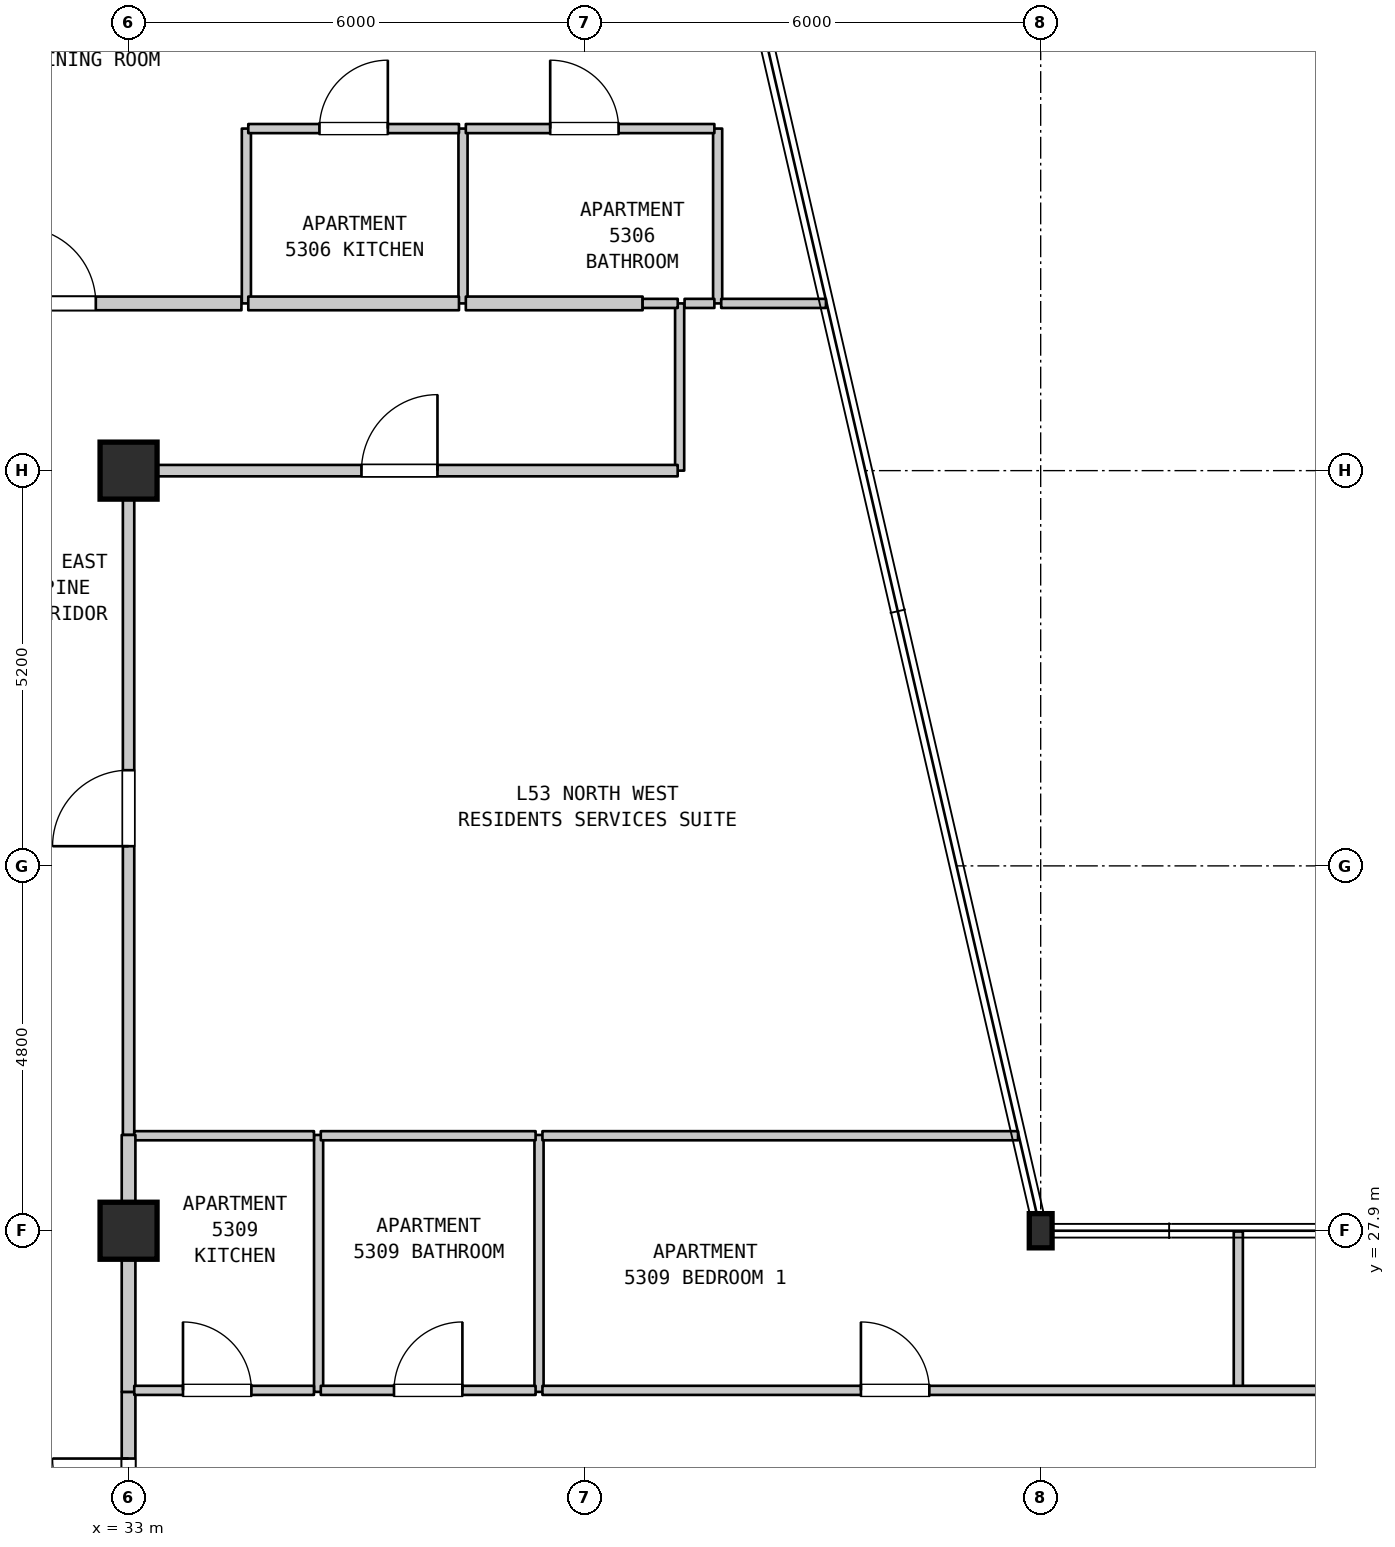
"""IFC4 building model, lengths in metres.
Left out: names, types, materials, properties, quantities, classifications, styles, units other than length and angle.
Written with IfcOpenShell. Run it as: python <this file> out.ifc"""

import sys

from ifc_helpers import new_model, si_unit, direction, frame, frame_2d, origin, origin_2d, place, context, subcontext, project, spatial, rectangle, i_section, extrude, element, fill, save


model = new_model("IFC4")
c1 = context("Model", 3, precision=1e-05, world=origin(), true_north=direction((0.0, 1.0)))
c2 = subcontext(c1, "Body", "Model", "MODEL_VIEW")
j1 = project(units=[si_unit("LENGTHUNIT", "METRE"), si_unit("PLANEANGLEUNIT", "RADIAN")], contexts=[c1])
p1 = place(None, origin())
s1 = spatial("IfcSite", under=j1, at=p1, CompositionType="ELEMENT")
p2 = place(p1, origin())
s2 = spatial("IfcBuilding", under=s1, at=p2, CompositionType="ELEMENT")
p3 = place(p2, frame((0.0, 0.0, 214.3)))
s3 = spatial("IfcBuildingStorey", under=s2, at=p3, CompositionType="ELEMENT", Elevation=214.3)
for number, where, z_axis, x_axis in (
    (1, (33.0, 27.9, 0.0), (0.0, 0.0, 1.0), (1.0, 0.0, 0.0)),
    (2, (33.0, 37.9, 0.0), (0.0, 0.0, 1.0), (1.0, 0.0, 0.0)),
):
    element("IfcColumn", number, at=place(p3, frame(where, z_axis=z_axis, x_axis=x_axis)), inside=s3, PredefinedType="COLUMN", context=c2, shape_type="SweptSolid", body=[
        extrude(rectangle(XDim=0.75, YDim=0.75, at=origin_2d()), origin(), (0.0, 0.0, 1.0), 3.7),
    ])
p4 = place(p3, frame((45.0, 27.9, 0.0), z_axis=(0.0, 0.0, 1.0), x_axis=(1.0, 0.0, 0.0)))
e3 = element("IfcColumn", 3, at=p4, inside=s3, PredefinedType="COLUMN", context=c2, shape_type="SweptSolid", body=[
    extrude(i_section(OverallWidth=0.3, OverallDepth=0.45, WebThickness=0.014, FlangeThickness=0.026, FilletRadius=0.027, at=origin_2d()), origin(), (0.0, 0.0, 1.0), 3.7),
])
p5 = place(p3, frame((33.0, 23.18, 0.0), z_axis=(0.0, 0.0, 1.0), x_axis=(0.0, 1.0, 0.0)))
e4 = element("IfcWall", 4, at=p5, inside=s3, PredefinedType="STANDARD", context=c2, shape_type="SweptSolid", body=[
    extrude(rectangle(XDim=2.6, YDim=0.18, at=frame_2d((1.3, 0.0))), origin(), (0.0, 0.0, 1.0), 2.98),
])
p6 = place(p5, frame((0.723, 0.0, 0.0)))
e5 = element("IfcOpeningElement", 5, at=p6, cuts=e4, PredefinedType="OPENING", context=c2, shape_type="SweptSolid", body=[
    extrude(rectangle(XDim=1.0, YDim=2.15, at=frame_2d((0.5, 1.075))), frame((0.0, 0.1, 0.0), z_axis=(0.0, -1.0, 0.0), x_axis=(1.0, 0.0, 0.0)), (0.0, 0.0, 1.0), 0.2),
])
p7 = place(p3, frame((33.0, 25.78, 0.0), z_axis=(0.0, 0.0, 1.0), x_axis=(0.0, 1.0, 0.0)))
e6 = element("IfcWall", 6, at=p7, inside=s3, PredefinedType="STANDARD", context=c2, shape_type="SweptSolid", body=[
    extrude(rectangle(XDim=2.12, YDim=0.18, at=frame_2d((1.06, 0.0))), origin(), (0.0, 0.0, 1.0), 2.98),
])
p8 = place(p3, frame((33.0, 29.16, 0.0), z_axis=(0.0, 0.0, 1.0), x_axis=(0.0, 1.0, 0.0)))
e7 = element("IfcWall", 7, at=p8, inside=s3, PredefinedType="STANDARD", context=c2, shape_type="SweptSolid", body=[
    extrude(rectangle(XDim=8.74, YDim=0.15, at=frame_2d((4.37, 0.0))), origin(), (0.0, 0.0, 1.0), 2.88),
])
p9 = place(p8, frame((3.799, 0.0, 0.0)))
e8 = element("IfcOpeningElement", 8, at=p9, cuts=e7, PredefinedType="OPENING", context=c2, shape_type="SweptSolid", body=[
    extrude(rectangle(XDim=1.0, YDim=2.15, at=frame_2d((0.5, 1.075))), frame((0.0, 0.085, 0.0), z_axis=(0.0, -1.0, 0.0), x_axis=(1.0, 0.0, 0.0)), (0.0, 0.0, 1.0), 0.17),
])
p10 = place(p3, frame((34.55, 40.1, 0.0), z_axis=(0.0, 0.0, 1.0), x_axis=(0.0, 1.0, 0.0)))
e9 = element("IfcWall", 9, at=p10, inside=s3, PredefinedType="PARTITIONING", context=c2, shape_type="SweptSolid", body=[
    extrude(rectangle(XDim=2.3, YDim=0.12, at=frame_2d((1.15, 0.0))), origin(), (0.0, 0.0, 1.0), 3.38),
])
p11 = place(p3, frame((35.5, 25.78, 0.0), z_axis=(0.0, 0.0, 1.0), x_axis=(0.0, 1.0, 0.0)))
e10 = element("IfcWall", 10, at=p11, inside=s3, PredefinedType="PARTITIONING", context=c2, shape_type="SweptSolid", body=[
    extrude(rectangle(XDim=3.38, YDim=0.12, at=frame_2d((1.69, 0.0))), origin(), (0.0, 0.0, 1.0), 3.38),
])
p12 = place(p3, frame((37.4, 40.1, 0.0), z_axis=(0.0, 0.0, 1.0), x_axis=(0.0, 1.0, 0.0)))
e11 = element("IfcWall", 11, at=p12, inside=s3, PredefinedType="PARTITIONING", context=c2, shape_type="SweptSolid", body=[
    extrude(rectangle(XDim=2.3, YDim=0.12, at=frame_2d((1.15, 0.0))), origin(), (0.0, 0.0, 1.0), 3.38),
])
p13 = place(p3, frame((38.4, 25.78, 0.0), z_axis=(0.0, 0.0, 1.0), x_axis=(0.0, 1.0, 0.0)))
e12 = element("IfcWall", 12, at=p13, inside=s3, PredefinedType="PARTITIONING", context=c2, shape_type="SweptSolid", body=[
    extrude(rectangle(XDim=3.38, YDim=0.12, at=frame_2d((1.69, 0.0))), origin(), (0.0, 0.0, 1.0), 3.38),
])
p14 = place(p3, frame((40.25, 37.9, 0.0), z_axis=(0.0, 0.0, 1.0), x_axis=(0.0, 1.0, 0.0)))
e13 = element("IfcWall", 13, at=p14, inside=s3, PredefinedType="PARTITIONING", context=c2, shape_type="SweptSolid", body=[
    extrude(rectangle(XDim=2.2, YDim=0.12, at=frame_2d((1.1, 0.0))), origin(), (0.0, 0.0, 1.0), 3.38),
])
p15 = place(p3, frame((40.75, 40.1, 0.0), z_axis=(0.0, 0.0, 1.0), x_axis=(0.0, 1.0, 0.0)))
e14 = element("IfcWall", 14, at=p15, inside=s3, PredefinedType="PARTITIONING", context=c2, shape_type="SweptSolid", body=[
    extrude(rectangle(XDim=2.3, YDim=0.12, at=frame_2d((1.15, 0.0))), origin(), (0.0, 0.0, 1.0), 3.38),
])
p16 = place(p3, frame((47.6, 25.78, 0.0), z_axis=(0.0, 0.0, 1.0), x_axis=(0.0, 1.0, 0.0)))
e15 = element("IfcWall", 15, at=p16, inside=s3, PredefinedType="PARTITIONING", context=c2, shape_type="SweptSolid", body=[
    extrude(rectangle(XDim=2.11, YDim=0.12, at=frame_2d((1.055, 0.0))), origin(), (0.0, 0.0, 1.0), 3.38),
])
p17 = place(p3, frame((33.075, 25.8, 0.0), z_axis=(0.0, 0.0, 1.0), x_axis=(1.0, 0.0, 0.0)))
e16 = element("IfcWall", 16, at=p17, inside=s3, PredefinedType="PARTITIONING", context=c2, shape_type="SweptSolid", body=[
    extrude(rectangle(XDim=2.364, YDim=0.12, at=frame_2d((1.182, 0.0))), origin(), (0.0, 0.0, 1.0), 3.38),
])
p18 = place(p17, frame((0.641, 0.0, 0.0)))
e17 = element("IfcOpeningElement", 17, at=p18, cuts=e16, PredefinedType="OPENING", context=c2, shape_type="SweptSolid", body=[
    extrude(rectangle(XDim=0.9, YDim=2.15, at=frame_2d((0.45, 1.075))), frame((0.0, 0.07, 0.0), z_axis=(0.0, -1.0, 0.0), x_axis=(1.0, 0.0, 0.0)), (0.0, 0.0, 1.0), 0.14),
])
p19 = place(p3, frame((35.529, 25.8, 0.0), z_axis=(0.0, 0.0, 1.0), x_axis=(1.0, 0.0, 0.0)))
e18 = element("IfcWall", 18, at=p19, inside=s3, PredefinedType="PARTITIONING", context=c2, shape_type="SweptSolid", body=[
    extrude(rectangle(XDim=2.826, YDim=0.12, at=frame_2d((1.413, 0.0))), origin(), (0.0, 0.0, 1.0), 3.38),
])
p20 = place(p19, frame((0.963, 0.0, 0.0)))
e19 = element("IfcOpeningElement", 19, at=p20, cuts=e18, PredefinedType="OPENING", context=c2, shape_type="SweptSolid", body=[
    extrude(rectangle(XDim=0.9, YDim=2.1, at=frame_2d((0.45, 1.05))), frame((0.0, 0.07, 0.0), z_axis=(0.0, -1.0, 0.0), x_axis=(1.0, 0.0, 0.0)), (0.0, 0.0, 1.0), 0.14),
])
p21 = place(p3, frame((38.445, 25.8, 0.0), z_axis=(0.0, 0.0, 1.0), x_axis=(1.0, 0.0, 0.0)))
e20 = element("IfcWall", 20, at=p21, inside=s3, PredefinedType="PARTITIONING", context=c2, shape_type="SweptSolid", body=[
    extrude(rectangle(XDim=18.545, YDim=0.12, at=frame_2d((9.272, 0.0))), origin(), (0.0, 0.0, 1.0), 3.38),
])
p22 = place(p21, frame((4.19, 0.0, 0.0)))
e21 = element("IfcOpeningElement", 21, at=p22, cuts=e20, PredefinedType="OPENING", context=c2, shape_type="SweptSolid", body=[
    extrude(rectangle(XDim=0.9, YDim=2.15, at=frame_2d((0.45, 1.075))), frame((0.0, 0.07, 0.0), z_axis=(0.0, -1.0, 0.0), x_axis=(1.0, 0.0, 0.0)), (0.0, 0.0, 1.0), 0.14),
])
p23 = place(p21, frame((13.335, 0.0, 0.0)))
e22 = element("IfcOpeningElement", 22, at=p23, cuts=e20, PredefinedType="OPENING", context=c2, shape_type="SweptSolid", body=[
    extrude(rectangle(XDim=0.9, YDim=2.15, at=frame_2d((0.45, 1.075))), frame((0.0, 0.07, 0.0), z_axis=(0.0, -1.0, 0.0), x_axis=(1.0, 0.0, 0.0)), (0.0, 0.0, 1.0), 0.14),
])
p24 = place(p3, frame((33.075, 29.15, 0.0), z_axis=(0.0, 0.0, 1.0), x_axis=(1.0, 0.0, 0.0)))
e23 = element("IfcWall", 23, at=p24, inside=s3, PredefinedType="PARTITIONING", context=c2, shape_type="SweptSolid", body=[
    extrude(rectangle(XDim=2.364, YDim=0.12, at=frame_2d((1.182, 0.0))), origin(), (0.0, 0.0, 1.0), 3.38),
])
p25 = place(p3, frame((35.529, 29.15, 0.0), z_axis=(0.0, 0.0, 1.0), x_axis=(1.0, 0.0, 0.0)))
e24 = element("IfcWall", 24, at=p25, inside=s3, PredefinedType="PARTITIONING", context=c2, shape_type="SweptSolid", body=[
    extrude(rectangle(XDim=2.826, YDim=0.12, at=frame_2d((1.413, 0.0))), origin(), (0.0, 0.0, 1.0), 3.38),
])
p26 = place(p3, frame((38.445, 29.15, 0.0), z_axis=(0.0, 0.0, 1.0), x_axis=(1.0, 0.0, 0.0)))
e25 = element("IfcWall", 25, at=p26, inside=s3, PredefinedType="PARTITIONING", context=c2, shape_type="SweptSolid", body=[
    extrude(rectangle(XDim=6.257, YDim=0.12, at=frame_2d((3.128, 0.0))), origin(), (0.0, 0.0, 1.0), 3.38),
])
p27 = place(p3, frame((33.06, 37.9, 0.0), z_axis=(0.0, 0.0, 1.0), x_axis=(1.0, 0.0, 0.0)))
e26 = element("IfcWall", 26, at=p27, inside=s3, PredefinedType="STANDARD", context=c2, shape_type="SweptSolid", body=[
    extrude(rectangle(XDim=7.164, YDim=0.15, at=frame_2d((3.582, 0.0))), origin(), (0.0, 0.0, 1.0), 3.38),
])
p28 = place(p27, frame((3.004, 0.0, 0.0)))
e27 = element("IfcOpeningElement", 27, at=p28, cuts=e26, PredefinedType="OPENING", context=c2, shape_type="SweptSolid", body=[
    extrude(rectangle(XDim=1.0, YDim=2.15, at=frame_2d((0.5, 1.075))), frame((0.0, 0.085, 0.0), z_axis=(0.0, -1.0, 0.0), x_axis=(1.0, 0.0, 0.0)), (0.0, 0.0, 1.0), 0.17),
])
p29 = place(p3, frame((29.395, 40.1, 0.0), z_axis=(0.0, 0.0, 1.0), x_axis=(1.0, 0.0, 0.0)))
e28 = element("IfcWall", 28, at=p29, inside=s3, PredefinedType="STANDARD", context=c2, shape_type="SweptSolid", body=[
    extrude(rectangle(XDim=5.09, YDim=0.18, at=frame_2d((2.545, 0.0))), origin(), (0.0, 0.0, 1.0), 3.38),
])
p30 = place(p29, frame((2.174, 0.0, 0.0)))
e29 = element("IfcOpeningElement", 29, at=p30, cuts=e28, PredefinedType="OPENING", context=c2, shape_type="SweptSolid", body=[
    extrude(rectangle(XDim=1.0, YDim=2.15, at=frame_2d((0.5, 1.075))), frame((0.0, 0.1, 0.0), z_axis=(0.0, -1.0, 0.0), x_axis=(1.0, 0.0, 0.0)), (0.0, 0.0, 1.0), 0.2),
])
p31 = place(p3, frame((34.575, 40.1, 0.0), z_axis=(0.0, 0.0, 1.0), x_axis=(1.0, 0.0, 0.0)))
e30 = element("IfcWall", 30, at=p31, inside=s3, PredefinedType="STANDARD", context=c2, shape_type="SweptSolid", body=[
    extrude(rectangle(XDim=2.772, YDim=0.18, at=frame_2d((1.386, 0.0))), origin(), (0.0, 0.0, 1.0), 3.38),
])
p32 = place(p3, frame((37.437, 40.1, 0.0), z_axis=(0.0, 0.0, 1.0), x_axis=(1.0, 0.0, 0.0)))
e31 = element("IfcWall", 31, at=p32, inside=s3, PredefinedType="STANDARD", context=c2, shape_type="SweptSolid", body=[
    extrude(rectangle(XDim=2.326, YDim=0.18, at=frame_2d((1.163, 0.0))), origin(), (0.0, 0.0, 1.0), 3.38),
])
p33 = place(p3, frame((39.763, 40.1, 0.0), z_axis=(0.0, 0.0, 1.0), x_axis=(1.0, 0.0, 0.0)))
e32 = element("IfcWall", 32, at=p33, inside=s3, PredefinedType="PARTITIONING", context=c2, shape_type="SweptSolid", body=[
    extrude(rectangle(XDim=0.462, YDim=0.12, at=frame_2d((0.231, 0.0))), origin(), (0.0, 0.0, 1.0), 3.38),
])
p34 = place(p3, frame((40.315, 40.1, 0.0), z_axis=(0.0, 0.0, 1.0), x_axis=(1.0, 0.0, 0.0)))
e33 = element("IfcWall", 33, at=p34, inside=s3, PredefinedType="PARTITIONING", context=c2, shape_type="SweptSolid", body=[
    extrude(rectangle(XDim=0.392, YDim=0.12, at=frame_2d((0.196, 0.0))), origin(), (0.0, 0.0, 1.0), 3.38),
])
p35 = place(p3, frame((40.797, 40.1, 0.0), z_axis=(0.0, 0.0, 1.0), x_axis=(1.0, 0.0, 0.0)))
e34 = element("IfcWall", 34, at=p35, inside=s3, PredefinedType="PARTITIONING", context=c2, shape_type="SweptSolid", body=[
    extrude(rectangle(XDim=1.378, YDim=0.12, at=frame_2d((0.689, 0.0))), origin(), (0.0, 0.0, 1.0), 3.38),
])
p36 = place(p3, frame((34.575, 42.4, 0.0), z_axis=(0.0, 0.0, 1.0), x_axis=(1.0, 0.0, 0.0)))
e35 = element("IfcWall", 35, at=p36, inside=s3, PredefinedType="PARTITIONING", context=c2, shape_type="SweptSolid", body=[
    extrude(rectangle(XDim=2.772, YDim=0.12, at=frame_2d((1.386, 0.0))), origin(), (0.0, 0.0, 1.0), 3.38),
])
p37 = place(p36, frame((0.936, 0.0, 0.0)))
e36 = element("IfcOpeningElement", 36, at=p37, cuts=e35, PredefinedType="OPENING", context=c2, shape_type="SweptSolid", body=[
    extrude(rectangle(XDim=0.9, YDim=2.15, at=frame_2d((0.45, 1.075))), frame((0.0, 0.07, 0.0), z_axis=(0.0, -1.0, 0.0), x_axis=(1.0, 0.0, 0.0)), (0.0, 0.0, 1.0), 0.14),
])
p38 = place(p3, frame((37.437, 42.4, 0.0), z_axis=(0.0, 0.0, 1.0), x_axis=(1.0, 0.0, 0.0)))
e37 = element("IfcWall", 37, at=p38, inside=s3, PredefinedType="PARTITIONING", context=c2, shape_type="SweptSolid", body=[
    extrude(rectangle(XDim=3.27, YDim=0.12, at=frame_2d((1.635, 0.0))), origin(), (0.0, 0.0, 1.0), 3.38),
])
p39 = place(p38, frame((1.11, 0.0, 0.0)))
e38 = element("IfcOpeningElement", 38, at=p39, cuts=e37, PredefinedType="OPENING", context=c2, shape_type="SweptSolid", body=[
    extrude(rectangle(XDim=0.9, YDim=2.1, at=frame_2d((0.45, 1.05))), frame((0.0, 0.07, 0.0), z_axis=(0.0, -1.0, 0.0), x_axis=(1.0, 0.0, 0.0)), (0.0, 0.0, 1.0), 0.14),
])
p40 = place(p3, frame((33.0, 27.9, 0.0), z_axis=(0.0, 0.0, 1.0), x_axis=(0.0, 1.0, 0.0)))
e39 = element("IfcWall", 39, at=p40, inside=s3, PredefinedType="STANDARD", context=c2, shape_type="SweptSolid", body=[
    extrude(rectangle(XDim=1.26, YDim=0.18, at=frame_2d((0.63, 0.0))), origin(), (0.0, 0.0, 1.0), 2.88),
])
p41 = place(p6, origin())
e40 = element("IfcDoor", 40, at=p41, inside=s3, OperationType="SINGLE_SWING_RIGHT", PredefinedType="DOOR", context=c2, shape_type="SweptSolid", body=[
    extrude(rectangle(XDim=1.0, YDim=2.15, at=frame_2d((0.5, 1.075))), frame((0.0, 0.025, 0.0), z_axis=(0.0, -1.0, 0.0), x_axis=(1.0, 0.0, 0.0)), (0.0, 0.0, 1.0), 0.05),
])
fill(e5, e40)
p42 = place(p9, origin())
e41 = element("IfcDoor", 41, at=p42, inside=s3, OperationType="SINGLE_SWING_LEFT", PredefinedType="DOOR", context=c2, shape_type="SweptSolid", body=[
    extrude(rectangle(XDim=1.0, YDim=2.15, at=frame_2d((0.5, 1.075))), frame((0.0, 0.025, 0.0), z_axis=(0.0, -1.0, 0.0), x_axis=(1.0, 0.0, 0.0)), (0.0, 0.0, 1.0), 0.05),
])
fill(e8, e41)
p43 = place(p18, origin())
e42 = element("IfcDoor", 42, at=p43, inside=s3, OperationType="SINGLE_SWING_LEFT", PredefinedType="DOOR", context=c2, shape_type="SweptSolid", body=[
    extrude(rectangle(XDim=0.9, YDim=2.15, at=frame_2d((0.45, 1.075))), frame((0.0, 0.025, 0.0), z_axis=(0.0, -1.0, 0.0), x_axis=(1.0, 0.0, 0.0)), (0.0, 0.0, 1.0), 0.05),
])
fill(e17, e42)
p44 = place(p20, origin())
e43 = element("IfcDoor", 43, at=p44, inside=s3, OperationType="SINGLE_SWING_RIGHT", PredefinedType="DOOR", context=c2, shape_type="SweptSolid", body=[
    extrude(rectangle(XDim=0.9, YDim=2.1, at=frame_2d((0.45, 1.05))), frame((0.0, 0.025, 0.0), z_axis=(0.0, -1.0, 0.0), x_axis=(1.0, 0.0, 0.0)), (0.0, 0.0, 1.0), 0.05),
])
fill(e19, e43)
p45 = place(p22, origin())
e44 = element("IfcDoor", 44, at=p45, inside=s3, OperationType="SINGLE_SWING_LEFT", PredefinedType="DOOR", context=c2, shape_type="SweptSolid", body=[
    extrude(rectangle(XDim=0.9, YDim=2.15, at=frame_2d((0.45, 1.075))), frame((0.0, 0.025, 0.0), z_axis=(0.0, -1.0, 0.0), x_axis=(1.0, 0.0, 0.0)), (0.0, 0.0, 1.0), 0.05),
])
fill(e21, e44)
p46 = place(p28, origin())
e45 = element("IfcDoor", 45, at=p46, inside=s3, OperationType="SINGLE_SWING_RIGHT", PredefinedType="DOOR", context=c2, shape_type="SweptSolid", body=[
    extrude(rectangle(XDim=1.0, YDim=2.15, at=frame_2d((0.5, 1.075))), frame((0.0, 0.025, 0.0), z_axis=(0.0, -1.0, 0.0), x_axis=(1.0, 0.0, 0.0)), (0.0, 0.0, 1.0), 0.05),
])
fill(e27, e45)
p47 = place(p30, origin())
e46 = element("IfcDoor", 46, at=p47, inside=s3, OperationType="SINGLE_SWING_LEFT", PredefinedType="DOOR", context=c2, shape_type="SweptSolid", body=[
    extrude(rectangle(XDim=1.0, YDim=2.15, at=frame_2d((0.5, 1.075))), frame((0.0, 0.025, 0.0), z_axis=(0.0, -1.0, 0.0), x_axis=(1.0, 0.0, 0.0)), (0.0, 0.0, 1.0), 0.05),
])
fill(e29, e46)
p48 = place(p37, origin())
e47 = element("IfcDoor", 47, at=p48, inside=s3, OperationType="SINGLE_SWING_RIGHT", PredefinedType="DOOR", context=c2, shape_type="SweptSolid", body=[
    extrude(rectangle(XDim=0.9, YDim=2.15, at=frame_2d((0.45, 1.075))), frame((0.0, 0.025, 0.0), z_axis=(0.0, -1.0, 0.0), x_axis=(1.0, 0.0, 0.0)), (0.0, 0.0, 1.0), 0.05),
])
fill(e36, e47)
p49 = place(p39, origin())
e48 = element("IfcDoor", 48, at=p49, inside=s3, OperationType="SINGLE_SWING_LEFT", PredefinedType="DOOR", context=c2, shape_type="SweptSolid", body=[
    extrude(rectangle(XDim=0.9, YDim=2.1, at=frame_2d((0.45, 1.05))), frame((0.0, 0.025, 0.0), z_axis=(0.0, -1.0, 0.0), x_axis=(1.0, 0.0, 0.0)), (0.0, 0.0, 1.0), 0.05),
])
fill(e38, e48)
save(model, sys.argv[1])
